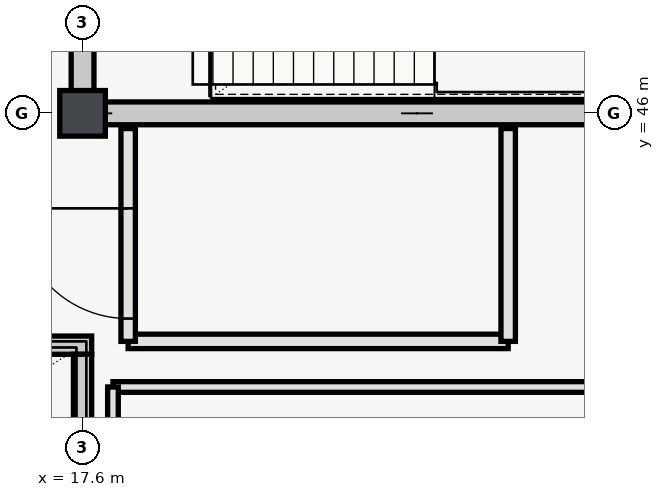
"""IFC4 building model, lengths in metres.
Left out: names, types, materials, properties, quantities, classifications, styles, units other than length and angle.
Written with IfcOpenShell. Run it as: python <this file> out.ifc"""

import sys

from ifc_helpers import new_model, si_unit, direction, frame, frame_2d, origin, origin_2d, place, context, subcontext, project, spatial, rectangle, extrude, element, fill, save


model = new_model("IFC4")
c1 = context("Model", 3, precision=1e-05, world=origin(), true_north=direction((0.0, 1.0)))
c2 = subcontext(c1, "Body", "Model", "MODEL_VIEW")
j1 = project(units=[si_unit("LENGTHUNIT", "METRE"), si_unit("PLANEANGLEUNIT", "RADIAN")], contexts=[c1])
p1 = place(None, origin())
s1 = spatial("IfcSite", under=j1, at=p1, CompositionType="ELEMENT")
p2 = place(p1, origin())
s2 = spatial("IfcBuilding", under=s1, at=p2, CompositionType="ELEMENT")
p3 = place(p2, frame((0.0, 0.0, 24.6)))
s3 = spatial("IfcBuildingStorey", under=s2, at=p3, CompositionType="ELEMENT", Elevation=24.6)
p4 = place(p3, frame((17.6, 46.0, 0.0), z_axis=(0.0, 0.0, 1.0), x_axis=(1.0, 0.0, 0.0)))
e1 = element("IfcColumn", 1, at=p4, inside=s3, PredefinedType="COLUMN", context=c2, shape_type="SweptSolid", body=[
    extrude(rectangle(XDim=0.6, YDim=0.6, at=origin_2d()), origin(), (0.0, 0.0, 1.0), 4.2),
])
p5 = place(p3, frame((17.45, 46.0, 0.0), z_axis=(0.0, 0.0, 1.0), x_axis=(1.0, 0.0, 0.0)))
e2 = element("IfcWall", 2, at=p5, inside=s3, PredefinedType="SHEAR", context=c2, shape_type="SweptSolid", body=[
    extrude(rectangle(XDim=9.1, YDim=0.3, at=frame_2d((4.55, 0.0))), origin(), (0.0, 0.0, 1.0), 3.92),
])
p6 = place(p3, frame((17.6, 46.15, 0.0), z_axis=(0.0, 0.0, 1.0), x_axis=(0.0, 1.0, 0.0)))
e3 = element("IfcWall", 3, at=p6, inside=s3, PredefinedType="SHEAR", context=c2, shape_type="SweptSolid", body=[
    extrude(rectangle(XDim=7.7, YDim=0.3, at=frame_2d((3.85, 0.0))), origin(), (0.0, 0.0, 1.0), 3.92),
])
p7 = place(p6, frame((1.65, 0.0, 0.0)))
e4 = element("IfcOpeningElement", 4, at=p7, cuts=e3, PredefinedType="OPENING", context=c2, shape_type="SweptSolid", body=[
    extrude(rectangle(XDim=1.4, YDim=2.2, at=frame_2d((0.7, 1.1))), frame((0.0, 0.16, 0.0), z_axis=(0.0, -1.0, 0.0), x_axis=(1.0, 0.0, 0.0)), (0.0, 0.0, 1.0), 0.32),
])
p8 = place(p3, frame((18.2, 43.0, 0.0), z_axis=(0.0, 0.0, 1.0), x_axis=(1.0, 0.0, 0.0)))
e5 = element("IfcWall", 5, at=p8, inside=s3, PredefinedType="PARTITIONING", context=c2, shape_type="SweptSolid", body=[
    extrude(rectangle(XDim=5.0, YDim=0.19, at=frame_2d((2.5, 0.0))), origin(), (0.0, 0.0, 1.0), 3.92),
])
p9 = place(p3, frame((18.2, 45.8, 0.0), z_axis=(0.0, 0.0, 1.0), x_axis=(0.0, -1.0, 0.0)))
e6 = element("IfcWall", 6, at=p9, inside=s3, PredefinedType="PARTITIONING", context=c2, shape_type="SweptSolid", body=[
    extrude(rectangle(XDim=2.8, YDim=0.19, at=frame_2d((1.4, 0.0))), origin(), (0.0, 0.0, 1.0), 3.92),
])
p10 = place(p9, frame((1.05, 0.0, 0.0)))
e7 = element("IfcOpeningElement", 7, at=p10, cuts=e6, PredefinedType="OPENING", context=c2, shape_type="SweptSolid", body=[
    extrude(rectangle(XDim=1.45, YDim=2.2, at=frame_2d((0.725, 1.1))), frame((0.0, 0.105, 0.0), z_axis=(0.0, -1.0, 0.0), x_axis=(1.0, 0.0, 0.0)), (0.0, 0.0, 1.0), 0.21),
])
p11 = place(p3, frame((23.2, 43.0, 0.0), z_axis=(0.0, 0.0, 1.0), x_axis=(0.0, 1.0, 0.0)))
e8 = element("IfcWall", 8, at=p11, inside=s3, PredefinedType="PARTITIONING", context=c2, shape_type="SweptSolid", body=[
    extrude(rectangle(XDim=2.8, YDim=0.19, at=frame_2d((1.4, 0.0))), origin(), (0.0, 0.0, 1.0), 3.92),
])
p12 = place(p3, frame((26.2, 42.4, 0.0), z_axis=(0.0, 0.0, 1.0), x_axis=(-1.0, 0.0, 0.0)))
e9 = element("IfcWall", 9, at=p12, inside=s3, PredefinedType="PARTITIONING", context=c2, shape_type="SweptSolid", body=[
    extrude(rectangle(XDim=8.2, YDim=0.14, at=frame_2d((4.1, 0.0))), origin(), (0.0, 0.0, 1.0), 3.92),
])
p13 = place(p3, frame((18.0, 42.4, 0.0), z_axis=(0.0, 0.0, 1.0), x_axis=(0.0, -1.0, 0.0)))
e10 = element("IfcWall", 10, at=p13, inside=s3, PredefinedType="PARTITIONING", context=c2, shape_type="SweptSolid", body=[
    extrude(rectangle(XDim=11.6, YDim=0.14, at=frame_2d((5.8, 0.0))), origin(), (0.0, 0.0, 1.0), 3.92),
])
p14 = place(p3, frame((17.72, 42.95, 0.0), z_axis=(0.0, 0.0, 1.0), x_axis=(-1.0, 0.0, 0.0)))
e11 = element("IfcWall", 11, at=p14, inside=s3, PredefinedType="SHEAR", context=c2, shape_type="SweptSolid", body=[
    extrude(rectangle(XDim=9.04, YDim=0.24, at=frame_2d((4.52, 0.0))), origin(), (0.0, 0.0, 1.0), 3.95),
])
p15 = place(p3, frame((17.6, 38.67, 0.0), z_axis=(0.0, 0.0, 1.0), x_axis=(0.0, 1.0, 0.0)))
e12 = element("IfcWall", 12, at=p15, inside=s3, PredefinedType="SHEAR", context=c2, shape_type="SweptSolid", body=[
    extrude(rectangle(XDim=4.16, YDim=0.24, at=frame_2d((2.08, 0.0))), origin(), (0.0, 0.0, 1.0), 3.95),
])
p16 = place(p10, origin())
e13 = element("IfcDoor", 13, at=p16, inside=s3, OperationType="SINGLE_SWING_LEFT", PredefinedType="DOOR", context=c2, shape_type="SweptSolid", body=[
    extrude(rectangle(XDim=1.45, YDim=2.2, at=frame_2d((0.725, 1.1))), frame((0.0, 0.025, 0.0), z_axis=(0.0, -1.0, 0.0), x_axis=(1.0, 0.0, 0.0)), (0.0, 0.0, 1.0), 0.05),
])
fill(e7, e13)
save(model, sys.argv[1])
